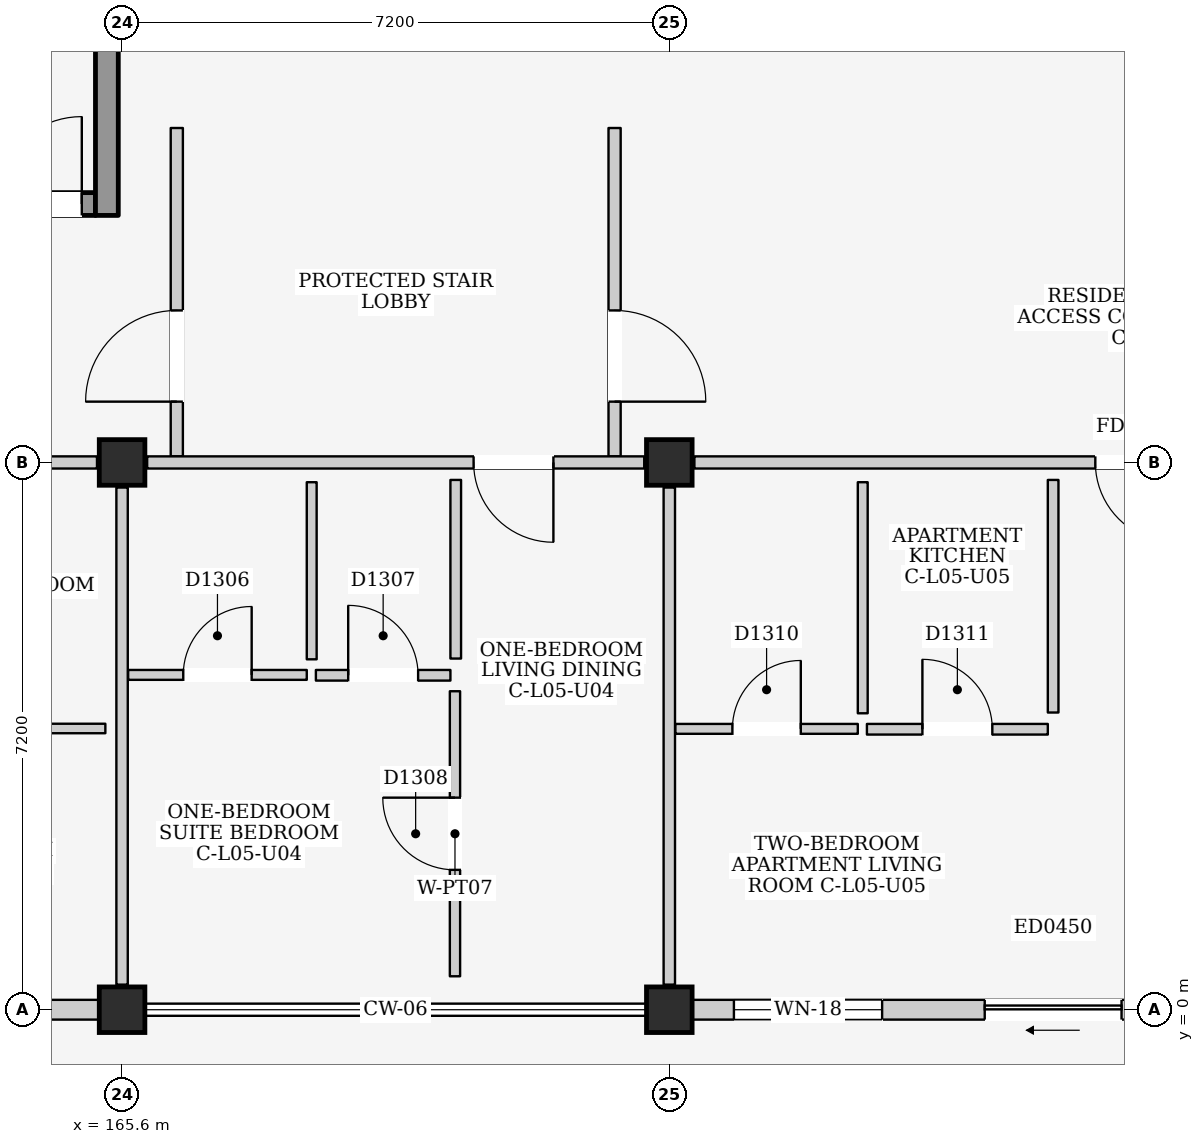
"""IFC4 building model, lengths in metres.
Left out: names, types, materials, properties, quantities, classifications, styles, units other than length and angle.
Written with IfcOpenShell. Run it as: python <this file> out.ifc"""

import sys

from ifc_helpers import new_model, si_unit, direction, frame, frame_2d, origin, origin_2d, place, context, subcontext, project, spatial, rectangle, extrude, element, fill, save


model = new_model("IFC4")
c1 = context("Model", 3, precision=1e-05, world=origin(), true_north=direction((0.0, 1.0)))
c2 = subcontext(c1, "Body", "Model", "MODEL_VIEW")
j1 = project(units=[si_unit("LENGTHUNIT", "METRE"), si_unit("PLANEANGLEUNIT", "RADIAN")], contexts=[c1])
p1 = place(None, origin())
s1 = spatial("IfcSite", under=j1, at=p1, CompositionType="ELEMENT")
p2 = place(p1, origin())
s2 = spatial("IfcBuilding", under=s1, at=p2, CompositionType="ELEMENT")
p3 = place(p2, frame((0.0, 0.0, 18.6)))
s3 = spatial("IfcBuildingStorey", under=s2, at=p3, CompositionType="ELEMENT", Elevation=18.6)
for number, where, z_axis, x_axis in (
    (1, (165.6, 0.0, 0.0), (0.0, 0.0, 1.0), (1.0, 0.0, 0.0)),
    (2, (165.6, 7.2, 0.0), (0.0, 0.0, 1.0), (1.0, 0.0, 0.0)),
    (3, (172.8, 0.0, 0.0), (0.0, 0.0, 1.0), (1.0, 0.0, 0.0)),
    (4, (172.8, 7.2, 0.0), (0.0, 0.0, 1.0), (1.0, 0.0, 0.0)),
):
    element("IfcColumn", number, at=place(p3, frame(where, z_axis=z_axis, x_axis=x_axis)), inside=s3, PredefinedType="COLUMN", context=c2, shape_type="SweptSolid", body=[
        extrude(rectangle(XDim=0.6, YDim=0.6, at=origin_2d()), origin(), (0.0, 0.0, 1.0), 3.3),
    ])
p4 = place(p3, frame((158.7, 0.0, 0.0), z_axis=(0.0, 0.0, 1.0), x_axis=(1.0, 0.0, 0.0)))
e5 = element("IfcWall", 5, at=p4, inside=s3, PredefinedType="ELEMENTEDWALL", context=c2, shape_type="SweptSolid", body=[
    extrude(rectangle(XDim=6.6, YDim=0.26, at=frame_2d((3.3, 0.0))), origin(), (0.0, 0.0, 1.0), 2.595),
])
p5 = place(p4, frame((3.85, 0.0, 0.0)))
e6 = element("IfcOpeningElement", 6, at=p5, cuts=e5, PredefinedType="OPENING", context=c2, shape_type="SweptSolid", body=[
    extrude(rectangle(XDim=2.0, YDim=2.12, at=frame_2d((1.0, 1.06))), frame((0.0, 0.145, 0.0), z_axis=(0.0, -1.0, 0.0), x_axis=(1.0, 0.0, 0.0)), (0.0, 0.0, 1.0), 0.29),
])
p6 = place(p4, frame((0.55, 0.0, 0.9)))
e7 = element("IfcOpeningElement", 7, at=p6, cuts=e5, PredefinedType="OPENING", context=c2, shape_type="SweptSolid", body=[
    extrude(rectangle(XDim=1.45, YDim=1.4, at=frame_2d((0.725, 0.7))), frame((0.0, 0.145, 0.0), z_axis=(0.0, -1.0, 0.0), x_axis=(1.0, 0.0, 0.0)), (0.0, 0.0, 1.0), 0.29),
])
p7 = place(p3, frame((173.1, 0.0, 0.0), z_axis=(0.0, 0.0, 1.0), x_axis=(1.0, 0.0, 0.0)))
e8 = element("IfcWall", 8, at=p7, inside=s3, PredefinedType="ELEMENTEDWALL", context=c2, shape_type="SweptSolid", body=[
    extrude(rectangle(XDim=6.6, YDim=0.26, at=frame_2d((3.3, 0.0))), origin(), (0.0, 0.0, 1.0), 2.595),
])
p8 = place(p7, frame((3.85, 0.0, 0.0)))
e9 = element("IfcOpeningElement", 9, at=p8, cuts=e8, PredefinedType="OPENING", context=c2, shape_type="SweptSolid", body=[
    extrude(rectangle(XDim=1.8, YDim=2.12, at=frame_2d((0.9, 1.06))), frame((0.0, 0.145, 0.0), z_axis=(0.0, -1.0, 0.0), x_axis=(1.0, 0.0, 0.0)), (0.0, 0.0, 1.0), 0.29),
])
p9 = place(p7, frame((0.55, 0.0, 0.9)))
e10 = element("IfcOpeningElement", 10, at=p9, cuts=e8, PredefinedType="OPENING", context=c2, shape_type="SweptSolid", body=[
    extrude(rectangle(XDim=1.95, YDim=1.55, at=frame_2d((0.975, 0.775))), frame((0.0, 0.145, 0.0), z_axis=(0.0, -1.0, 0.0), x_axis=(1.0, 0.0, 0.0)), (0.0, 0.0, 1.0), 0.29),
])
p10 = place(p3, frame((158.75, 10.6, 0.0), z_axis=(0.0, 0.0, 1.0), x_axis=(1.0, 0.0, 0.0)))
e11 = element("IfcWall", 11, at=p10, inside=s3, PredefinedType="SHEAR", context=c2, shape_type="SweptSolid", body=[
    extrude(rectangle(XDim=6.5, YDim=0.3, at=frame_2d((3.25, 0.0))), origin(), (0.0, 0.0, 1.0), 3.06),
])
p11 = place(p10, frame((5.17, 0.0, 0.0)))
e12 = element("IfcOpeningElement", 12, at=p11, cuts=e11, PredefinedType="OPENING", context=c2, shape_type="SweptSolid", body=[
    extrude(rectangle(XDim=1.15, YDim=2.2, at=frame_2d((0.575, 1.1))), frame((0.0, 0.165, 0.0), z_axis=(0.0, -1.0, 0.0), x_axis=(1.0, 0.0, 0.0)), (0.0, 0.0, 1.0), 0.33),
])
p12 = place(p3, frame((165.4, 10.45, 0.0), z_axis=(0.0, 0.0, 1.0), x_axis=(0.0, 1.0, 0.0)))
e13 = element("IfcWall", 13, at=p12, inside=s3, PredefinedType="SHEAR", context=c2, shape_type="SweptSolid", body=[
    extrude(rectangle(XDim=3.6, YDim=0.3, at=frame_2d((1.8, 0.0))), origin(), (0.0, 0.0, 1.0), 3.06),
])
p13 = place(p3, frame((166.32, 7.28, 0.0), z_axis=(0.0, 0.0, 1.0), x_axis=(0.0, 1.0, 0.0)))
e14 = element("IfcWall", 14, at=p13, inside=s3, PredefinedType="PARTITIONING", context=c2, shape_type="SweptSolid", body=[
    extrude(rectangle(XDim=4.32, YDim=0.16, at=frame_2d((2.16, 0.0))), origin(), (0.0, 0.0, 1.0), 3.06),
])
p14 = place(p13, frame((0.72, 0.0, 0.0)))
e15 = element("IfcOpeningElement", 15, at=p14, cuts=e14, PredefinedType="OPENING", context=c2, shape_type="SweptSolid", body=[
    extrude(rectangle(XDim=1.2, YDim=2.2, at=frame_2d((0.6, 1.1))), frame((0.0, 0.095, 0.0), z_axis=(0.0, -1.0, 0.0), x_axis=(1.0, 0.0, 0.0)), (0.0, 0.0, 1.0), 0.19),
])
p15 = place(p3, frame((172.08, 7.28, 0.0), z_axis=(0.0, 0.0, 1.0), x_axis=(0.0, 1.0, 0.0)))
e16 = element("IfcWall", 16, at=p15, inside=s3, PredefinedType="PARTITIONING", context=c2, shape_type="SweptSolid", body=[
    extrude(rectangle(XDim=4.32, YDim=0.16, at=frame_2d((2.16, 0.0))), origin(), (0.0, 0.0, 1.0), 3.06),
])
p16 = place(p15, frame((0.72, 0.0, 0.0)))
e17 = element("IfcOpeningElement", 17, at=p16, cuts=e16, PredefinedType="OPENING", context=c2, shape_type="SweptSolid", body=[
    extrude(rectangle(XDim=1.2, YDim=2.2, at=frame_2d((0.6, 1.1))), frame((0.0, 0.095, 0.0), z_axis=(0.0, -1.0, 0.0), x_axis=(1.0, 0.0, 0.0)), (0.0, 0.0, 1.0), 0.19),
])
p17 = place(p3, frame((158.73, 7.2, 0.0), z_axis=(0.0, 0.0, 1.0), x_axis=(1.0, 0.0, 0.0)))
e18 = element("IfcWall", 18, at=p17, inside=s3, PredefinedType="PARTITIONING", context=c2, shape_type="SweptSolid", body=[
    extrude(rectangle(XDim=6.54, YDim=0.16, at=frame_2d((3.27, 0.0))), origin(), (0.0, 0.0, 1.0), 2.445),
])
p18 = place(p3, frame((165.6, 0.33, 0.0), z_axis=(0.0, 0.0, 1.0), x_axis=(0.0, 1.0, 0.0)))
e19 = element("IfcWall", 19, at=p18, inside=s3, PredefinedType="PARTITIONING", context=c2, shape_type="SweptSolid", body=[
    extrude(rectangle(XDim=6.54, YDim=0.15, at=frame_2d((3.27, 0.0))), origin(), (0.0, 0.0, 1.0), 2.545),
])
p19 = place(p3, frame((161.32, 3.7, 0.0), z_axis=(0.0, 0.0, 1.0), x_axis=(1.0, 0.0, 0.0)))
e20 = element("IfcWall", 20, at=p19, inside=s3, PredefinedType="PARTITIONING", context=c2, shape_type="SweptSolid", body=[
    extrude(rectangle(XDim=4.06, YDim=0.125, at=frame_2d((2.03, 0.0))), origin(), (0.0, 0.0, 1.0), 3.06),
])
p20 = place(p3, frame((165.93, 7.2, 0.0), z_axis=(0.0, 0.0, 1.0), x_axis=(1.0, 0.0, 0.0)))
e21 = element("IfcWall", 21, at=p20, inside=s3, PredefinedType="PARTITIONING", context=c2, shape_type="SweptSolid", body=[
    extrude(rectangle(XDim=6.54, YDim=0.16, at=frame_2d((3.27, 0.0))), origin(), (0.0, 0.0, 1.0), 2.445),
])
p21 = place(p20, frame((4.295, 0.0, 0.0)))
e22 = element("IfcOpeningElement", 22, at=p21, cuts=e21, PredefinedType="OPENING", context=c2, shape_type="SweptSolid", body=[
    extrude(rectangle(XDim=1.05, YDim=2.15, at=frame_2d((0.525, 1.075))), frame((0.0, 0.095, 0.0), z_axis=(0.0, -1.0, 0.0), x_axis=(1.0, 0.0, 0.0)), (0.0, 0.0, 1.0), 0.19),
])
p22 = place(p3, frame((172.8, 0.33, 0.0), z_axis=(0.0, 0.0, 1.0), x_axis=(0.0, 1.0, 0.0)))
e23 = element("IfcWall", 23, at=p22, inside=s3, PredefinedType="PARTITIONING", context=c2, shape_type="SweptSolid", body=[
    extrude(rectangle(XDim=6.54, YDim=0.15, at=frame_2d((3.27, 0.0))), origin(), (0.0, 0.0, 1.0), 2.545),
])
p23 = place(p3, frame((165.68, 4.405, 0.0), z_axis=(0.0, 0.0, 1.0), x_axis=(1.0, 0.0, 0.0)))
e24 = element("IfcWall", 24, at=p23, inside=s3, PredefinedType="PARTITIONING", context=c2, shape_type="SweptSolid", body=[
    extrude(rectangle(XDim=2.35, YDim=0.13, at=frame_2d((1.175, 0.0))), origin(), (0.0, 0.0, 1.0), 3.06),
])
p24 = place(p23, frame((0.725, 0.0, 0.0)))
e25 = element("IfcOpeningElement", 25, at=p24, cuts=e24, PredefinedType="OPENING", context=c2, shape_type="SweptSolid", body=[
    extrude(rectangle(XDim=0.9, YDim=2.1, at=frame_2d((0.45, 1.05))), frame((0.0, 0.08, 0.0), z_axis=(0.0, -1.0, 0.0), x_axis=(1.0, 0.0, 0.0)), (0.0, 0.0, 1.0), 0.16),
])
p25 = place(p3, frame((168.095, 4.61, 0.0), z_axis=(0.0, 0.0, 1.0), x_axis=(0.0, 1.0, 0.0)))
e26 = element("IfcWall", 26, at=p25, inside=s3, PredefinedType="PARTITIONING", context=c2, shape_type="SweptSolid", body=[
    extrude(rectangle(XDim=2.33, YDim=0.13, at=frame_2d((1.165, 0.0))), origin(), (0.0, 0.0, 1.0), 3.06),
])
p26 = place(p3, frame((168.15, 4.4, 0.0), z_axis=(0.0, 0.0, 1.0), x_axis=(1.0, 0.0, 0.0)))
e27 = element("IfcWall", 27, at=p26, inside=s3, PredefinedType="PARTITIONING", context=c2, shape_type="SweptSolid", body=[
    extrude(rectangle(XDim=1.77, YDim=0.14, at=frame_2d((0.885, 0.0))), origin(), (0.0, 0.0, 1.0), 3.06),
])
p27 = place(p26, frame((0.425, 0.0, 0.0)))
e28 = element("IfcOpeningElement", 28, at=p27, cuts=e27, PredefinedType="OPENING", context=c2, shape_type="SweptSolid", body=[
    extrude(rectangle(XDim=0.92, YDim=2.1, at=frame_2d((0.46, 1.05))), frame((0.0, 0.085, 0.0), z_axis=(0.0, -1.0, 0.0), x_axis=(1.0, 0.0, 0.0)), (0.0, 0.0, 1.0), 0.17),
])
p28 = place(p3, frame((169.99, 4.62, 0.0), z_axis=(0.0, 0.0, 1.0), x_axis=(0.0, 1.0, 0.0)))
e29 = element("IfcWall", 29, at=p28, inside=s3, PredefinedType="PARTITIONING", context=c2, shape_type="SweptSolid", body=[
    extrude(rectangle(XDim=2.35, YDim=0.14, at=frame_2d((1.175, 0.0))), origin(), (0.0, 0.0, 1.0), 3.06),
])
p29 = place(p3, frame((169.98, 0.44, 0.0), z_axis=(0.0, 0.0, 1.0), x_axis=(0.0, 1.0, 0.0)))
e30 = element("IfcWall", 30, at=p29, inside=s3, PredefinedType="PARTITIONING", context=c2, shape_type="SweptSolid", body=[
    extrude(rectangle(XDim=3.75, YDim=0.135, at=frame_2d((1.875, 0.0))), origin(), (0.0, 0.0, 1.0), 3.06),
])
p30 = place(p29, frame((1.4, 0.0, 0.0)))
e31 = element("IfcOpeningElement", 31, at=p30, cuts=e30, PredefinedType="OPENING", context=c2, shape_type="SweptSolid", body=[
    extrude(rectangle(XDim=0.95, YDim=2.15, at=frame_2d((0.475, 1.075))), frame((0.0, 0.083, 0.0), z_axis=(0.0, -1.0, 0.0), x_axis=(1.0, 0.0, 0.0)), (0.0, 0.0, 1.0), 0.165),
])
p31 = place(p3, frame((173.13, 7.2, 0.0), z_axis=(0.0, 0.0, 1.0), x_axis=(1.0, 0.0, 0.0)))
e32 = element("IfcWall", 32, at=p31, inside=s3, PredefinedType="PARTITIONING", context=c2, shape_type="SweptSolid", body=[
    extrude(rectangle(XDim=6.54, YDim=0.16, at=frame_2d((3.27, 0.0))), origin(), (0.0, 0.0, 1.0), 2.445),
])
p32 = place(p31, frame((5.275, 0.0, 0.0)))
e33 = element("IfcOpeningElement", 33, at=p32, cuts=e32, PredefinedType="OPENING", context=c2, shape_type="SweptSolid", body=[
    extrude(rectangle(XDim=1.05, YDim=2.15, at=frame_2d((0.525, 1.075))), frame((0.0, 0.095, 0.0), z_axis=(0.0, -1.0, 0.0), x_axis=(1.0, 0.0, 0.0)), (0.0, 0.0, 1.0), 0.19),
])
p33 = place(p3, frame((172.88, 3.695, 0.0), z_axis=(0.0, 0.0, 1.0), x_axis=(1.0, 0.0, 0.0)))
e34 = element("IfcWall", 34, at=p33, inside=s3, PredefinedType="PARTITIONING", context=c2, shape_type="SweptSolid", body=[
    extrude(rectangle(XDim=2.4, YDim=0.13, at=frame_2d((1.2, 0.0))), origin(), (0.0, 0.0, 1.0), 3.06),
])
p34 = place(p33, frame((0.75, 0.0, 0.0)))
e35 = element("IfcOpeningElement", 35, at=p34, cuts=e34, PredefinedType="OPENING", context=c2, shape_type="SweptSolid", body=[
    extrude(rectangle(XDim=0.9, YDim=2.1, at=frame_2d((0.45, 1.05))), frame((0.0, 0.08, 0.0), z_axis=(0.0, -1.0, 0.0), x_axis=(1.0, 0.0, 0.0)), (0.0, 0.0, 1.0), 0.16),
])
p35 = place(p3, frame((175.345, 3.9, 0.0), z_axis=(0.0, 0.0, 1.0), x_axis=(0.0, 1.0, 0.0)))
e36 = element("IfcWall", 36, at=p35, inside=s3, PredefinedType="PARTITIONING", context=c2, shape_type="SweptSolid", body=[
    extrude(rectangle(XDim=3.04, YDim=0.13, at=frame_2d((1.52, 0.0))), origin(), (0.0, 0.0, 1.0), 3.06),
])
p36 = place(p3, frame((175.4, 3.69, 0.0), z_axis=(0.0, 0.0, 1.0), x_axis=(1.0, 0.0, 0.0)))
e37 = element("IfcWall", 37, at=p36, inside=s3, PredefinedType="PARTITIONING", context=c2, shape_type="SweptSolid", body=[
    extrude(rectangle(XDim=2.38, YDim=0.14, at=frame_2d((1.19, 0.0))), origin(), (0.0, 0.0, 1.0), 3.06),
])
p37 = place(p36, frame((0.73, 0.0, 0.0)))
e38 = element("IfcOpeningElement", 38, at=p37, cuts=e37, PredefinedType="OPENING", context=c2, shape_type="SweptSolid", body=[
    extrude(rectangle(XDim=0.92, YDim=2.1, at=frame_2d((0.46, 1.05))), frame((0.0, 0.085, 0.0), z_axis=(0.0, -1.0, 0.0), x_axis=(1.0, 0.0, 0.0)), (0.0, 0.0, 1.0), 0.17),
])
p38 = place(p3, frame((177.85, 3.91, 0.0), z_axis=(0.0, 0.0, 1.0), x_axis=(0.0, 1.0, 0.0)))
e39 = element("IfcWall", 39, at=p38, inside=s3, PredefinedType="PARTITIONING", context=c2, shape_type="SweptSolid", body=[
    extrude(rectangle(XDim=3.06, YDim=0.14, at=frame_2d((1.53, 0.0))), origin(), (0.0, 0.0, 1.0), 3.06),
])
p39 = place(p8, frame((1.8, 0.0, 0.0), z_axis=(0.0, 0.0, 1.0), x_axis=(-1.0, 0.0, 0.0)))
e40 = element("IfcDoor", 40, at=p39, inside=s3, OperationType="SLIDING_TO_LEFT", PredefinedType="DOOR", context=c2, shape_type="SweptSolid", body=[
    extrude(rectangle(XDim=1.8, YDim=2.12, at=frame_2d((0.9, 1.06))), frame((0.0, 0.025, 0.0), z_axis=(0.0, -1.0, 0.0), x_axis=(1.0, 0.0, 0.0)), (0.0, 0.0, 1.0), 0.05),
])
fill(e9, e40)
p40 = place(p9, origin())
e41 = element("IfcWindow", 41, at=p40, inside=s3, PartitioningType="DOUBLE_PANEL_VERTICAL", PredefinedType="WINDOW", context=c2, shape_type="SweptSolid", body=[
    extrude(rectangle(XDim=1.95, YDim=1.55, at=frame_2d((0.975, 0.775))), frame((0.0, 0.03, 0.0), z_axis=(0.0, -1.0, 0.0), x_axis=(1.0, 0.0, 0.0)), (0.0, 0.0, 1.0), 0.06),
])
fill(e10, e41)
p41 = place(p11, origin())
e42 = element("IfcDoor", 42, at=p41, inside=s3, OperationType="SINGLE_SWING_RIGHT", PredefinedType="DOOR", context=c2, shape_type="SweptSolid", body=[
    extrude(rectangle(XDim=1.15, YDim=2.2, at=frame_2d((0.575, 1.1))), frame((0.0, 0.025, 0.0), z_axis=(0.0, -1.0, 0.0), x_axis=(1.0, 0.0, 0.0)), (0.0, 0.0, 1.0), 0.05),
])
fill(e12, e42)
p42 = place(p14, origin())
e43 = element("IfcDoor", 43, at=p42, inside=s3, OperationType="SINGLE_SWING_LEFT", PredefinedType="DOOR", context=c2, shape_type="SweptSolid", body=[
    extrude(rectangle(XDim=1.2, YDim=2.2, at=frame_2d((0.6, 1.1))), frame((0.0, 0.025, 0.0), z_axis=(0.0, -1.0, 0.0), x_axis=(1.0, 0.0, 0.0)), (0.0, 0.0, 1.0), 0.05),
])
fill(e15, e43)
p43 = place(p16, frame((1.2, 0.0, 0.0), z_axis=(0.0, 0.0, 1.0), x_axis=(-1.0, 0.0, 0.0)))
e44 = element("IfcDoor", 44, at=p43, inside=s3, OperationType="SINGLE_SWING_RIGHT", PredefinedType="DOOR", context=c2, shape_type="SweptSolid", body=[
    extrude(rectangle(XDim=1.2, YDim=2.2, at=frame_2d((0.6, 1.1))), frame((0.0, 0.025, 0.0), z_axis=(0.0, -1.0, 0.0), x_axis=(1.0, 0.0, 0.0)), (0.0, 0.0, 1.0), 0.05),
])
fill(e17, e44)
p44 = place(p21, frame((1.05, 0.0, 0.0), z_axis=(0.0, 0.0, 1.0), x_axis=(-1.0, 0.0, 0.0)))
e45 = element("IfcDoor", 45, at=p44, inside=s3, OperationType="SINGLE_SWING_LEFT", PredefinedType="DOOR", context=c2, shape_type="SweptSolid", body=[
    extrude(rectangle(XDim=1.05, YDim=2.15, at=frame_2d((0.525, 1.075))), frame((0.0, 0.025, 0.0), z_axis=(0.0, -1.0, 0.0), x_axis=(1.0, 0.0, 0.0)), (0.0, 0.0, 1.0), 0.05),
])
fill(e22, e45)
p45 = place(p24, origin())
e46 = element("IfcDoor", 46, at=p45, inside=s3, OperationType="SINGLE_SWING_RIGHT", PredefinedType="DOOR", context=c2, shape_type="SweptSolid", body=[
    extrude(rectangle(XDim=0.9, YDim=2.1, at=frame_2d((0.45, 1.05))), frame((0.0, 0.025, 0.0), z_axis=(0.0, -1.0, 0.0), x_axis=(1.0, 0.0, 0.0)), (0.0, 0.0, 1.0), 0.05),
])
fill(e25, e46)
p46 = place(p27, origin())
e47 = element("IfcDoor", 47, at=p46, inside=s3, OperationType="SINGLE_SWING_LEFT", PredefinedType="DOOR", context=c2, shape_type="SweptSolid", body=[
    extrude(rectangle(XDim=0.92, YDim=2.1, at=frame_2d((0.46, 1.05))), frame((0.0, 0.025, 0.0), z_axis=(0.0, -1.0, 0.0), x_axis=(1.0, 0.0, 0.0)), (0.0, 0.0, 1.0), 0.05),
])
fill(e28, e47)
p47 = place(p30, origin())
e48 = element("IfcDoor", 48, at=p47, inside=s3, OperationType="SINGLE_SWING_RIGHT", PredefinedType="DOOR", context=c2, shape_type="SweptSolid", body=[
    extrude(rectangle(XDim=0.95, YDim=2.15, at=frame_2d((0.475, 1.075))), frame((0.0, 0.025, 0.0), z_axis=(0.0, -1.0, 0.0), x_axis=(1.0, 0.0, 0.0)), (0.0, 0.0, 1.0), 0.05),
])
fill(e31, e48)
p48 = place(p32, frame((1.05, 0.0, 0.0), z_axis=(0.0, 0.0, 1.0), x_axis=(-1.0, 0.0, 0.0)))
e49 = element("IfcDoor", 49, at=p48, inside=s3, OperationType="SINGLE_SWING_LEFT", PredefinedType="DOOR", context=c2, shape_type="SweptSolid", body=[
    extrude(rectangle(XDim=1.05, YDim=2.15, at=frame_2d((0.525, 1.075))), frame((0.0, 0.025, 0.0), z_axis=(0.0, -1.0, 0.0), x_axis=(1.0, 0.0, 0.0)), (0.0, 0.0, 1.0), 0.05),
])
fill(e33, e49)
p49 = place(p34, origin())
e50 = element("IfcDoor", 50, at=p49, inside=s3, OperationType="SINGLE_SWING_RIGHT", PredefinedType="DOOR", context=c2, shape_type="SweptSolid", body=[
    extrude(rectangle(XDim=0.9, YDim=2.1, at=frame_2d((0.45, 1.05))), frame((0.0, 0.025, 0.0), z_axis=(0.0, -1.0, 0.0), x_axis=(1.0, 0.0, 0.0)), (0.0, 0.0, 1.0), 0.05),
])
fill(e35, e50)
p50 = place(p37, origin())
e51 = element("IfcDoor", 51, at=p50, inside=s3, OperationType="SINGLE_SWING_LEFT", PredefinedType="DOOR", context=c2, shape_type="SweptSolid", body=[
    extrude(rectangle(XDim=0.92, YDim=2.1, at=frame_2d((0.46, 1.05))), frame((0.0, 0.025, 0.0), z_axis=(0.0, -1.0, 0.0), x_axis=(1.0, 0.0, 0.0)), (0.0, 0.0, 1.0), 0.05),
])
fill(e38, e51)
save(model, sys.argv[1])
